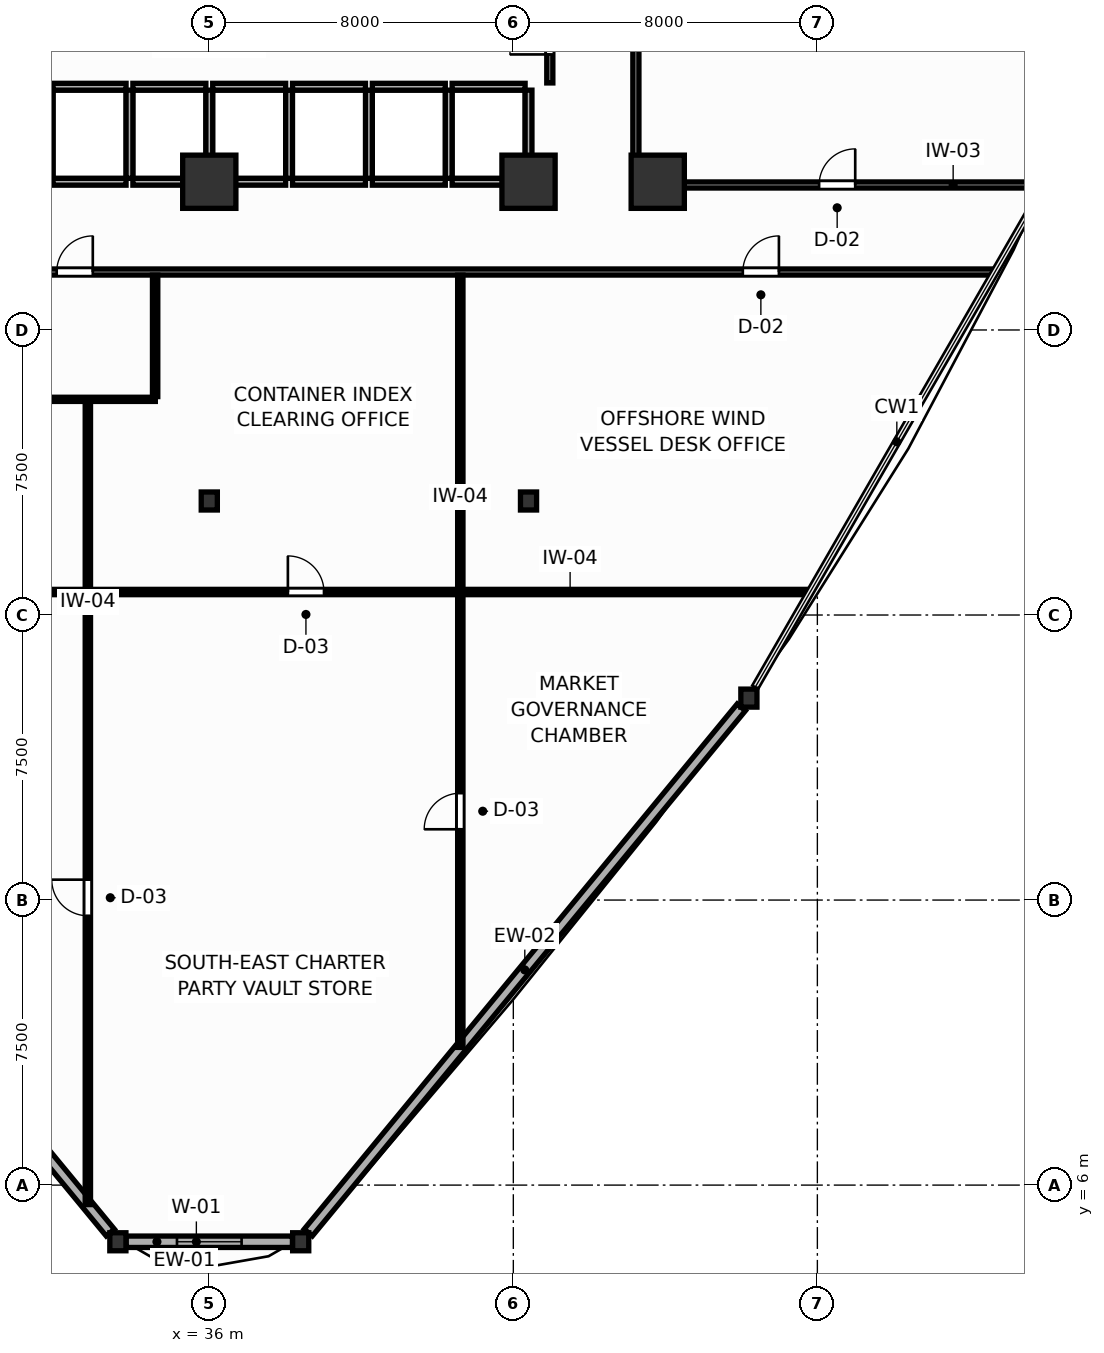
"""IFC4 building model, lengths in metres.
Left out: names, types, materials, properties, quantities, classifications, styles, units other than length and angle.
Written with IfcOpenShell. Run it as: python <this file> out.ifc"""

import sys

from ifc_helpers import new_model, si_unit, direction, frame, frame_2d, origin, origin_2d, place, context, subcontext, project, spatial, rectangle, i_section, extrude, source, transform, mapped, element, fill, save


model = new_model("IFC4")
c1 = context("Model", 3, precision=1e-05, world=origin(), true_north=direction((0.0, 1.0)))
c2 = subcontext(c1, "Body", "Model", "MODEL_VIEW")
j1 = project(units=[si_unit("LENGTHUNIT", "METRE"), si_unit("PLANEANGLEUNIT", "RADIAN")], contexts=[c1])
p1 = place(None, origin())
s1 = spatial("IfcSite", under=j1, at=p1, CompositionType="ELEMENT")
p2 = place(p1, origin())
s2 = spatial("IfcBuilding", under=s1, at=p2, CompositionType="ELEMENT")
p3 = place(p2, frame((0.0, 0.0, 51.3)))
s3 = spatial("IfcBuildingStorey", under=s2, at=p3, CompositionType="ELEMENT", Elevation=51.3)
m1 = source(origin(), c2, "Body", "SweptSolid", [
    extrude(rectangle(XDim=1.4, YDim=1.4, at=origin_2d()), origin(), (0.0, 0.0, 1.0), 3.9),
])
for number, where, z_axis, x_axis in (
    (1, (44.4, 32.4, 0.0), (0.0, 0.0, 1.0), (1.0, 0.0, 0.0)),
    (2, (36.0, 32.4, 0.0), (0.0, 0.0, 1.0), (1.0, 0.0, 0.0)),
    (3, (47.8, 32.4, 0.0), (0.0, 0.0, 1.0), (1.0, 0.0, 0.0)),
):
    element("IfcColumn", number, at=place(p3, frame(where, z_axis=z_axis, x_axis=x_axis)), inside=s3, PredefinedType="COLUMN", context=c2, shape_type="MappedRepresentation", body=[
        mapped(m1, transform((0.0, 0.0, 0.0), scale=1.0)),
    ])
m2 = source(origin(), c2, "Body", "SweptSolid", [
    extrude(i_section(OverallWidth=0.424, OverallDepth=0.474, WebThickness=0.045, FlangeThickness=0.072, FilletRadius=0.015, at=origin_2d()), origin(), (0.0, 0.0, 1.0), 3.9),
])
for number, where, z_axis, x_axis in (
    (4, (44.4, 24.0, 0.0), (0.0, 0.0, 1.0), (1.0, 0.0, 0.0)),
    (5, (36.0, 24.0, 0.0), (0.0, 0.0, 1.0), (1.0, 0.0, 0.0)),
    (6, (33.595, 4.509, 0.0), (0.0, 0.0, 1.0), (1.0, 0.0, 0.0)),
    (7, (38.405, 4.509, 0.0), (0.0, 0.0, 1.0), (1.0, 0.0, 0.0)),
    (8, (50.198, 18.813, 0.0), (0.0, 0.0, 1.0), (1.0, 0.0, 0.0)),
):
    element("IfcColumn", number, at=place(p3, frame(where, z_axis=z_axis, x_axis=x_axis)), inside=s3, PredefinedType="COLUMN", context=c2, shape_type="MappedRepresentation", body=[
        mapped(m2, transform((0.0, 0.0, 0.0), scale=1.0)),
    ])
p4 = place(p3, frame((22.001, 18.572, 0.0), z_axis=(0.0, 0.0, 1.0), x_axis=(0.636134749951, -0.771577980443, 0.0)))
e9 = element("IfcWall", 9, at=p4, inside=s3, PredefinedType="SOLIDWALL", context=c2, shape_type="SweptSolid", body=[
    extrude(rectangle(XDim=17.912, YDim=0.28, at=frame_2d((8.956, 0.0))), origin(), (0.0, 0.0, 1.0), 3.23),
])
p5 = place(p3, frame((33.812, 4.509, 0.0), z_axis=(0.0, 0.0, 1.0), x_axis=(1.0, 0.0, 0.0)))
e10 = element("IfcWall", 10, at=p5, inside=s3, PredefinedType="SOLIDWALL", context=c2, shape_type="SweptSolid", body=[
    extrude(rectangle(XDim=4.376, YDim=0.3, at=frame_2d((2.188, 0.0))), origin(), (0.0, 0.0, 1.0), 3.23),
])
p6 = place(p5, frame((1.338, 0.0, 0.75)))
e11 = element("IfcOpeningElement", 11, at=p6, cuts=e10, PredefinedType="OPENING", context=c2, shape_type="SweptSolid", body=[
    extrude(rectangle(XDim=1.7, YDim=1.75, at=frame_2d((0.85, 0.875))), frame((0.0, 0.16, 0.0), z_axis=(0.0, -1.0, 0.0), x_axis=(1.0, 0.0, 0.0)), (0.0, 0.0, 1.0), 0.32),
])
p7 = place(p3, frame((38.605, 4.751, 0.0), z_axis=(0.0, 0.0, 1.0), x_axis=(0.636134749951, 0.771577980443, 0.0)))
e12 = element("IfcWall", 12, at=p7, inside=s3, PredefinedType="SOLIDWALL", context=c2, shape_type="SweptSolid", body=[
    extrude(rectangle(XDim=17.912, YDim=0.28, at=frame_2d((8.956, 0.0))), origin(), (0.0, 0.0, 1.0), 3.23),
])
p8 = place(p3, frame((31.89, 34.9, 0.0), z_axis=(0.0, 0.0, 1.0), x_axis=(1.0, 0.0, 0.0)))
e13 = element("IfcWall", 13, at=p8, inside=s3, PredefinedType="PARTITIONING", context=c2, shape_type="SweptSolid", body=[
    extrude(rectangle(XDim=1.92, YDim=0.18, at=frame_2d((0.96, 0.0))), origin(), (0.0, 0.0, 1.0), 3.68),
])
p9 = place(p3, frame((31.89, 32.4, 0.0), z_axis=(0.0, 0.0, 1.0), x_axis=(1.0, 0.0, 0.0)))
e14 = element("IfcWall", 14, at=p9, inside=s3, PredefinedType="PARTITIONING", context=c2, shape_type="SweptSolid", body=[
    extrude(rectangle(XDim=1.92, YDim=0.18, at=frame_2d((0.96, 0.0))), origin(), (0.0, 0.0, 1.0), 3.18),
])
p10 = place(p3, frame((31.8, 32.49, 0.0), z_axis=(0.0, 0.0, 1.0), x_axis=(0.0, 1.0, 0.0)))
e15 = element("IfcWall", 15, at=p10, inside=s3, PredefinedType="PARTITIONING", context=c2, shape_type="SweptSolid", body=[
    extrude(rectangle(XDim=2.32, YDim=0.18, at=frame_2d((1.16, 0.0))), origin(), (0.0, 0.0, 1.0), 3.68),
])
p11 = place(p3, frame((33.99, 34.9, 0.0), z_axis=(0.0, 0.0, 1.0), x_axis=(1.0, 0.0, 0.0)))
e16 = element("IfcWall", 16, at=p11, inside=s3, PredefinedType="PARTITIONING", context=c2, shape_type="SweptSolid", body=[
    extrude(rectangle(XDim=1.92, YDim=0.18, at=frame_2d((0.96, 0.0))), origin(), (0.0, 0.0, 1.0), 3.68),
])
p12 = place(p3, frame((33.99, 32.4, 0.0), z_axis=(0.0, 0.0, 1.0), x_axis=(1.0, 0.0, 0.0)))
e17 = element("IfcWall", 17, at=p12, inside=s3, PredefinedType="PARTITIONING", context=c2, shape_type="SweptSolid", body=[
    extrude(rectangle(XDim=1.92, YDim=0.18, at=frame_2d((0.96, 0.0))), origin(), (0.0, 0.0, 1.0), 3.18),
])
p13 = place(p3, frame((33.9, 32.49, 0.0), z_axis=(0.0, 0.0, 1.0), x_axis=(0.0, 1.0, 0.0)))
e18 = element("IfcWall", 18, at=p13, inside=s3, PredefinedType="PARTITIONING", context=c2, shape_type="SweptSolid", body=[
    extrude(rectangle(XDim=2.32, YDim=0.18, at=frame_2d((1.16, 0.0))), origin(), (0.0, 0.0, 1.0), 3.68),
])
p14 = place(p3, frame((36.09, 34.9, 0.0), z_axis=(0.0, 0.0, 1.0), x_axis=(1.0, 0.0, 0.0)))
e19 = element("IfcWall", 19, at=p14, inside=s3, PredefinedType="PARTITIONING", context=c2, shape_type="SweptSolid", body=[
    extrude(rectangle(XDim=1.92, YDim=0.18, at=frame_2d((0.96, 0.0))), origin(), (0.0, 0.0, 1.0), 3.68),
])
p15 = place(p3, frame((36.09, 32.4, 0.0), z_axis=(0.0, 0.0, 1.0), x_axis=(1.0, 0.0, 0.0)))
e20 = element("IfcWall", 20, at=p15, inside=s3, PredefinedType="PARTITIONING", context=c2, shape_type="SweptSolid", body=[
    extrude(rectangle(XDim=1.92, YDim=0.18, at=frame_2d((0.96, 0.0))), origin(), (0.0, 0.0, 1.0), 3.18),
])
p16 = place(p3, frame((36.0, 32.49, 0.0), z_axis=(0.0, 0.0, 1.0), x_axis=(0.0, 1.0, 0.0)))
e21 = element("IfcWall", 21, at=p16, inside=s3, PredefinedType="PARTITIONING", context=c2, shape_type="SweptSolid", body=[
    extrude(rectangle(XDim=2.32, YDim=0.18, at=frame_2d((1.16, 0.0))), origin(), (0.0, 0.0, 1.0), 3.68),
])
p17 = place(p3, frame((38.19, 34.9, 0.0), z_axis=(0.0, 0.0, 1.0), x_axis=(1.0, 0.0, 0.0)))
e22 = element("IfcWall", 22, at=p17, inside=s3, PredefinedType="PARTITIONING", context=c2, shape_type="SweptSolid", body=[
    extrude(rectangle(XDim=1.92, YDim=0.18, at=frame_2d((0.96, 0.0))), origin(), (0.0, 0.0, 1.0), 3.68),
])
p18 = place(p3, frame((38.19, 32.4, 0.0), z_axis=(0.0, 0.0, 1.0), x_axis=(1.0, 0.0, 0.0)))
e23 = element("IfcWall", 23, at=p18, inside=s3, PredefinedType="PARTITIONING", context=c2, shape_type="SweptSolid", body=[
    extrude(rectangle(XDim=1.92, YDim=0.18, at=frame_2d((0.96, 0.0))), origin(), (0.0, 0.0, 1.0), 3.18),
])
p19 = place(p3, frame((38.1, 32.49, 0.0), z_axis=(0.0, 0.0, 1.0), x_axis=(0.0, 1.0, 0.0)))
e24 = element("IfcWall", 24, at=p19, inside=s3, PredefinedType="PARTITIONING", context=c2, shape_type="SweptSolid", body=[
    extrude(rectangle(XDim=2.32, YDim=0.18, at=frame_2d((1.16, 0.0))), origin(), (0.0, 0.0, 1.0), 3.68),
])
p20 = place(p3, frame((40.29, 34.9, 0.0), z_axis=(0.0, 0.0, 1.0), x_axis=(1.0, 0.0, 0.0)))
e25 = element("IfcWall", 25, at=p20, inside=s3, PredefinedType="PARTITIONING", context=c2, shape_type="SweptSolid", body=[
    extrude(rectangle(XDim=1.92, YDim=0.18, at=frame_2d((0.96, 0.0))), origin(), (0.0, 0.0, 1.0), 3.68),
])
p21 = place(p3, frame((40.29, 32.4, 0.0), z_axis=(0.0, 0.0, 1.0), x_axis=(1.0, 0.0, 0.0)))
e26 = element("IfcWall", 26, at=p21, inside=s3, PredefinedType="PARTITIONING", context=c2, shape_type="SweptSolid", body=[
    extrude(rectangle(XDim=1.92, YDim=0.18, at=frame_2d((0.96, 0.0))), origin(), (0.0, 0.0, 1.0), 3.18),
])
p22 = place(p3, frame((40.2, 32.49, 0.0), z_axis=(0.0, 0.0, 1.0), x_axis=(0.0, 1.0, 0.0)))
e27 = element("IfcWall", 27, at=p22, inside=s3, PredefinedType="PARTITIONING", context=c2, shape_type="SweptSolid", body=[
    extrude(rectangle(XDim=2.32, YDim=0.18, at=frame_2d((1.16, 0.0))), origin(), (0.0, 0.0, 1.0), 3.68),
])
p23 = place(p3, frame((42.39, 34.9, 0.0), z_axis=(0.0, 0.0, 1.0), x_axis=(1.0, 0.0, 0.0)))
e28 = element("IfcWall", 28, at=p23, inside=s3, PredefinedType="PARTITIONING", context=c2, shape_type="SweptSolid", body=[
    extrude(rectangle(XDim=1.92, YDim=0.18, at=frame_2d((0.96, 0.0))), origin(), (0.0, 0.0, 1.0), 3.68),
])
p24 = place(p3, frame((42.39, 32.4, 0.0), z_axis=(0.0, 0.0, 1.0), x_axis=(1.0, 0.0, 0.0)))
e29 = element("IfcWall", 29, at=p24, inside=s3, PredefinedType="PARTITIONING", context=c2, shape_type="SweptSolid", body=[
    extrude(rectangle(XDim=1.92, YDim=0.18, at=frame_2d((0.96, 0.0))), origin(), (0.0, 0.0, 1.0), 3.18),
])
for number, where, z_axis, x_axis in (
    (30, (42.3, 32.49, 0.0), (0.0, 0.0, 1.0), (0.0, 1.0, 0.0)),
    (31, (44.4, 32.49, 0.0), (0.0, 0.0, 1.0), (0.0, 1.0, 0.0)),
):
    element("IfcWall", number, at=place(p3, frame(where, z_axis=z_axis, x_axis=x_axis)), inside=s3, PredefinedType="PARTITIONING", context=c2, shape_type="SweptSolid", body=[
        extrude(rectangle(XDim=2.32, YDim=0.18, at=frame_2d((1.16, 0.0))), origin(), (0.0, 0.0, 1.0), 3.68),
    ])
p25 = place(p3, frame((44.96, 35.0, 0.0), z_axis=(0.0, 0.0, 1.0), x_axis=(0.0, 1.0, 0.0)))
e32 = element("IfcWall", 32, at=p25, inside=s3, PredefinedType="PARTITIONING", context=c2, shape_type="SweptSolid", body=[
    extrude(rectangle(XDim=2.65, YDim=0.16, at=frame_2d((1.325, 0.0))), origin(), (0.0, 0.0, 1.0), 3.68),
])
p26 = place(p25, frame((0.75, 0.0, 0.0)))
e33 = element("IfcOpeningElement", 33, at=p26, cuts=e32, PredefinedType="OPENING", context=c2, shape_type="SweptSolid", body=[
    extrude(rectangle(XDim=1.05, YDim=2.1, at=frame_2d((0.525, 1.05))), frame((0.0, 0.09, 0.0), z_axis=(0.0, -1.0, 0.0), x_axis=(1.0, 0.0, 0.0)), (0.0, 0.0, 1.0), 0.18),
])
p27 = place(p3, frame((15.348, 30.025, 0.0), z_axis=(0.0, 0.0, 1.0), x_axis=(1.0, 0.0, 0.0)))
e34 = element("IfcWall", 34, at=p27, inside=s3, PredefinedType="PARTITIONING", context=c2, shape_type="SweptSolid", body=[
    extrude(rectangle(XDim=41.303, YDim=0.16, at=frame_2d((20.652, 0.0))), origin(), (0.0, 0.0, 1.0), 3.68),
])
p28 = place(p27, frame((16.636, 0.0, 0.0)))
e35 = element("IfcOpeningElement", 35, at=p28, cuts=e34, PredefinedType="OPENING", context=c2, shape_type="SweptSolid", body=[
    extrude(rectangle(XDim=0.95, YDim=2.05, at=frame_2d((0.475, 1.025))), frame((0.0, 0.09, 0.0), z_axis=(0.0, -1.0, 0.0), x_axis=(1.0, 0.0, 0.0)), (0.0, 0.0, 1.0), 0.18),
])
p29 = place(p27, frame((4.12, 0.0, 0.0)))
e36 = element("IfcOpeningElement", 36, at=p29, cuts=e34, PredefinedType="OPENING", context=c2, shape_type="SweptSolid", body=[
    extrude(rectangle(XDim=0.95, YDim=2.05, at=frame_2d((0.475, 1.025))), frame((0.0, 0.09, 0.0), z_axis=(0.0, -1.0, 0.0), x_axis=(1.0, 0.0, 0.0)), (0.0, 0.0, 1.0), 0.18),
])
p30 = place(p27, frame((34.69, 0.0, 0.0)))
e37 = element("IfcOpeningElement", 37, at=p30, cuts=e34, PredefinedType="OPENING", context=c2, shape_type="SweptSolid", body=[
    extrude(rectangle(XDim=0.95, YDim=2.05, at=frame_2d((0.475, 1.025))), frame((0.0, 0.09, 0.0), z_axis=(0.0, -1.0, 0.0), x_axis=(1.0, 0.0, 0.0)), (0.0, 0.0, 1.0), 0.18),
])
p31 = place(p3, frame((47.225, 32.31, 0.0), z_axis=(0.0, 0.0, 1.0), x_axis=(0.0, 1.0, 0.0)))
e38 = element("IfcWall", 38, at=p31, inside=s3, PredefinedType="PARTITIONING", context=c2, shape_type="SweptSolid", body=[
    extrude(rectangle(XDim=23.984, YDim=0.16, at=frame_2d((11.992, 0.0))), origin(), (0.0, 0.0, 1.0), 3.68),
])
p32 = place(p31, frame((17.311, 0.0, 0.0)))
e39 = element("IfcOpeningElement", 39, at=p32, cuts=e38, PredefinedType="OPENING", context=c2, shape_type="SweptSolid", body=[
    extrude(rectangle(XDim=0.95, YDim=2.05, at=frame_2d((0.475, 1.025))), frame((0.0, 0.09, 0.0), z_axis=(0.0, -1.0, 0.0), x_axis=(1.0, 0.0, 0.0)), (0.0, 0.0, 1.0), 0.18),
])
p33 = place(p3, frame((47.307, 32.315, 0.0), z_axis=(0.0, 0.0, 1.0), x_axis=(1.0, 0.0, 0.0)))
e40 = element("IfcWall", 40, at=p33, inside=s3, PredefinedType="PARTITIONING", context=c2, shape_type="SweptSolid", body=[
    extrude(rectangle(XDim=10.663, YDim=0.16, at=frame_2d((5.332, 0.0))), origin(), (0.0, 0.0, 1.0), 3.18),
])
p34 = place(p33, frame((4.739, 0.0, 0.0)))
e41 = element("IfcOpeningElement", 41, at=p34, cuts=e40, PredefinedType="OPENING", context=c2, shape_type="SweptSolid", body=[
    extrude(rectangle(XDim=0.95, YDim=2.05, at=frame_2d((0.475, 1.025))), frame((0.0, 0.09, 0.0), z_axis=(0.0, -1.0, 0.0), x_axis=(1.0, 0.0, 0.0)), (0.0, 0.0, 1.0), 0.18),
])
p35 = place(p3, frame((24.39, 21.605, 0.0), z_axis=(0.0, 0.0, 1.0), x_axis=(1.0, 0.0, 0.0)))
e42 = element("IfcWall", 42, at=p35, inside=s3, PredefinedType="PARTITIONING", context=c2, shape_type="SweptSolid", body=[
    extrude(rectangle(XDim=27.4, YDim=0.14, at=frame_2d((13.7, 0.0))), origin(), (0.0, 0.0, 1.0), 3.68),
])
p36 = place(p35, frame((5.36, 0.0, 0.0)))
e43 = element("IfcOpeningElement", 43, at=p36, cuts=e42, PredefinedType="OPENING", context=c2, shape_type="SweptSolid", body=[
    extrude(rectangle(XDim=0.95, YDim=2.05, at=frame_2d((0.475, 1.025))), frame((0.0, 0.08, 0.0), z_axis=(0.0, -1.0, 0.0), x_axis=(1.0, 0.0, 0.0)), (0.0, 0.0, 1.0), 0.16),
])
p37 = place(p35, frame((13.678, 0.0, 0.0)))
e44 = element("IfcOpeningElement", 44, at=p37, cuts=e42, PredefinedType="OPENING", context=c2, shape_type="SweptSolid", body=[
    extrude(rectangle(XDim=0.95, YDim=2.05, at=frame_2d((0.475, 1.025))), frame((0.0, 0.08, 0.0), z_axis=(0.0, -1.0, 0.0), x_axis=(1.0, 0.0, 0.0)), (0.0, 0.0, 1.0), 0.16),
])
p38 = place(p3, frame((32.805, 5.487, 0.0), z_axis=(0.0, 0.0, 1.0), x_axis=(0.0, 1.0, 0.0)))
e45 = element("IfcWall", 45, at=p38, inside=s3, PredefinedType="PARTITIONING", context=c2, shape_type="SweptSolid", body=[
    extrude(rectangle(XDim=21.203, YDim=0.14, at=frame_2d((10.602, 0.0))), origin(), (0.0, 0.0, 1.0), 3.68),
])
p39 = place(p38, frame((7.6, 0.0, 0.0)))
e46 = element("IfcOpeningElement", 46, at=p39, cuts=e45, PredefinedType="OPENING", context=c2, shape_type="SweptSolid", body=[
    extrude(rectangle(XDim=0.95, YDim=2.05, at=frame_2d((0.475, 1.025))), frame((0.0, 0.08, 0.0), z_axis=(0.0, -1.0, 0.0), x_axis=(1.0, 0.0, 0.0)), (0.0, 0.0, 1.0), 0.16),
])
p40 = place(p3, frame((42.605, 9.623, 0.0), z_axis=(0.0, 0.0, 1.0), x_axis=(0.0, 1.0, 0.0)))
e47 = element("IfcWall", 47, at=p40, inside=s3, PredefinedType="PARTITIONING", context=c2, shape_type="SweptSolid", body=[
    extrude(rectangle(XDim=20.32, YDim=0.14, at=frame_2d((10.16, 0.0))), origin(), (0.0, 0.0, 1.0), 3.68),
])
p41 = place(p40, frame((5.74, 0.0, 0.0)))
e48 = element("IfcOpeningElement", 48, at=p41, cuts=e47, PredefinedType="OPENING", context=c2, shape_type="SweptSolid", body=[
    extrude(rectangle(XDim=0.95, YDim=2.05, at=frame_2d((0.475, 1.025))), frame((0.0, 0.08, 0.0), z_axis=(0.0, -1.0, 0.0), x_axis=(1.0, 0.0, 0.0)), (0.0, 0.0, 1.0), 0.16),
])
p42 = place(p3, frame((30.34, 26.675, 0.0), z_axis=(0.0, 0.0, 1.0), x_axis=(1.0, 0.0, 0.0)))
e49 = element("IfcWall", 49, at=p42, inside=s3, PredefinedType="MOVABLE", context=c2, shape_type="SweptSolid", body=[
    extrude(rectangle(XDim=4.24, YDim=0.11, at=frame_2d((2.12, 0.0))), origin(), (0.0, 0.0, 1.0), 3.68),
])
p43 = place(p3, frame((34.575, 26.747, 0.0), z_axis=(0.0, 0.0, 1.0), x_axis=(0.0, 1.0, 0.0)))
e50 = element("IfcWall", 50, at=p43, inside=s3, PredefinedType="PARTITIONING", context=c2, shape_type="SweptSolid", body=[
    extrude(rectangle(XDim=3.196, YDim=0.14, at=frame_2d((1.598, 0.0))), origin(), (0.0, 0.0, 1.0), 3.68),
])
p44 = place(p6, origin())
e51 = element("IfcWindow", 51, at=p44, inside=s3, PartitioningType="SINGLE_PANEL", PredefinedType="WINDOW", context=c2, shape_type="SweptSolid", body=[
    extrude(rectangle(XDim=1.7, YDim=1.75, at=frame_2d((0.85, 0.875))), frame((0.0, 0.03, 0.0), z_axis=(0.0, -1.0, 0.0), x_axis=(1.0, 0.0, 0.0)), (0.0, 0.0, 1.0), 0.06),
])
fill(e11, e51)
p45 = place(p26, origin())
e52 = element("IfcDoor", 52, at=p45, inside=s3, OperationType="SINGLE_SWING_LEFT", PredefinedType="DOOR", context=c2, shape_type="SweptSolid", body=[
    extrude(rectangle(XDim=1.05, YDim=2.1, at=frame_2d((0.525, 1.05))), frame((0.0, 0.025, 0.0), z_axis=(0.0, -1.0, 0.0), x_axis=(1.0, 0.0, 0.0)), (0.0, 0.0, 1.0), 0.05),
])
fill(e33, e52)
p46 = place(p28, origin())
e53 = element("IfcDoor", 53, at=p46, inside=s3, OperationType="SINGLE_SWING_RIGHT", PredefinedType="DOOR", context=c2, shape_type="SweptSolid", body=[
    extrude(rectangle(XDim=0.95, YDim=2.05, at=frame_2d((0.475, 1.025))), frame((0.0, 0.025, 0.0), z_axis=(0.0, -1.0, 0.0), x_axis=(1.0, 0.0, 0.0)), (0.0, 0.0, 1.0), 0.05),
])
fill(e35, e53)
p47 = place(p30, origin())
e54 = element("IfcDoor", 54, at=p47, inside=s3, OperationType="SINGLE_SWING_RIGHT", PredefinedType="DOOR", context=c2, shape_type="SweptSolid", body=[
    extrude(rectangle(XDim=0.95, YDim=2.05, at=frame_2d((0.475, 1.025))), frame((0.0, 0.025, 0.0), z_axis=(0.0, -1.0, 0.0), x_axis=(1.0, 0.0, 0.0)), (0.0, 0.0, 1.0), 0.05),
])
fill(e37, e54)
p48 = place(p34, origin())
e55 = element("IfcDoor", 55, at=p48, inside=s3, OperationType="SINGLE_SWING_RIGHT", PredefinedType="DOOR", context=c2, shape_type="SweptSolid", body=[
    extrude(rectangle(XDim=0.95, YDim=2.05, at=frame_2d((0.475, 1.025))), frame((0.0, 0.025, 0.0), z_axis=(0.0, -1.0, 0.0), x_axis=(1.0, 0.0, 0.0)), (0.0, 0.0, 1.0), 0.05),
])
fill(e41, e55)
p49 = place(p37, origin())
e56 = element("IfcDoor", 56, at=p49, inside=s3, OperationType="SINGLE_SWING_LEFT", PredefinedType="DOOR", context=c2, shape_type="SweptSolid", body=[
    extrude(rectangle(XDim=0.95, YDim=2.05, at=frame_2d((0.475, 1.025))), frame((0.0, 0.025, 0.0), z_axis=(0.0, -1.0, 0.0), x_axis=(1.0, 0.0, 0.0)), (0.0, 0.0, 1.0), 0.05),
])
fill(e44, e56)
p50 = place(p39, origin())
e57 = element("IfcDoor", 57, at=p50, inside=s3, OperationType="SINGLE_SWING_RIGHT", PredefinedType="DOOR", context=c2, shape_type="SweptSolid", body=[
    extrude(rectangle(XDim=0.95, YDim=2.05, at=frame_2d((0.475, 1.025))), frame((0.0, 0.025, 0.0), z_axis=(0.0, -1.0, 0.0), x_axis=(1.0, 0.0, 0.0)), (0.0, 0.0, 1.0), 0.05),
])
fill(e46, e57)
p51 = place(p41, origin())
e58 = element("IfcDoor", 58, at=p51, inside=s3, OperationType="SINGLE_SWING_LEFT", PredefinedType="DOOR", context=c2, shape_type="SweptSolid", body=[
    extrude(rectangle(XDim=0.95, YDim=2.05, at=frame_2d((0.475, 1.025))), frame((0.0, 0.025, 0.0), z_axis=(0.0, -1.0, 0.0), x_axis=(1.0, 0.0, 0.0)), (0.0, 0.0, 1.0), 0.05),
])
fill(e48, e58)
save(model, sys.argv[1])
